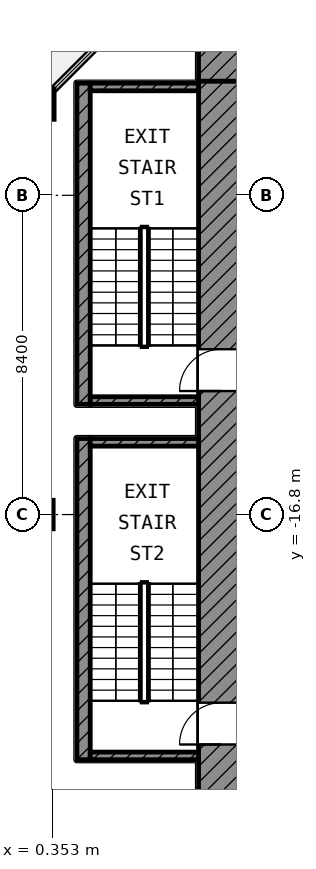
"""IFC4 building model, lengths in metres.
Left out: names, types, materials, properties, quantities, classifications, styles, units other than length and angle.
Written with IfcOpenShell. Run it as: python <this file> out.ifc"""

import sys

from ifc_helpers import new_model, si_unit, direction, frame, frame_2d, origin, origin_2d, place, context, subcontext, project, spatial, rectangle, extrude, element, fill, save


model = new_model("IFC4")
c1 = context("Model", 3, precision=1e-05, world=origin(), true_north=direction((0.0, 1.0)))
c2 = subcontext(c1, "Body", "Model", "MODEL_VIEW")
j1 = project(units=[si_unit("LENGTHUNIT", "METRE"), si_unit("PLANEANGLEUNIT", "RADIAN")], contexts=[c1])
p1 = place(None, origin())
s1 = spatial("IfcSite", under=j1, at=p1, CompositionType="ELEMENT")
p2 = place(p1, origin())
s2 = spatial("IfcBuilding", under=s1, at=p2, CompositionType="ELEMENT")
p3 = place(p2, frame((0.0, 0.0, 315.4)))
s3 = spatial("IfcBuildingStorey", under=s2, at=p3, CompositionType="ELEMENT", Elevation=315.4)
p4 = place(p3, frame((0.0, -6.0, 0.0), z_axis=(0.0, 0.0, 1.0), x_axis=(1.0, 0.0, 0.0)))
e1 = element("IfcColumn", 1, at=p4, inside=s3, PredefinedType="COLUMN", context=c2, shape_type="SweptSolid", body=[
    extrude(rectangle(XDim=0.8, YDim=0.8, at=origin_2d()), origin(), (0.0, 0.0, 1.0), 4.2),
])
p5 = place(p3, frame((0.0, -16.8, 0.0), z_axis=(0.0, 0.0, 1.0), x_axis=(1.0, 0.0, 0.0)))
e2 = element("IfcColumn", 2, at=p5, inside=s3, PredefinedType="COLUMN", context=c2, shape_type="SweptSolid", body=[
    extrude(rectangle(XDim=0.75, YDim=0.75, at=origin_2d()), origin(), (0.0, 0.0, 1.0), 4.2),
])
p6 = place(p3, frame((4.2, -4.8, 0.0), z_axis=(0.0, 0.0, 1.0), x_axis=(1.0, 0.0, 0.0)))
e3 = element("IfcWall", 3, at=p6, inside=s3, PredefinedType="SHEAR", context=c2, shape_type="SweptSolid", body=[
    extrude(rectangle(XDim=20.5, YDim=1.2, at=frame_2d((10.25, 0.0))), origin(), (0.0, 0.0, 1.0), 3.6),
])
p7 = place(p6, frame((1.95, 0.0, 0.0)))
e4 = element("IfcOpeningElement", 4, at=p7, cuts=e3, PredefinedType="OPENING", context=c2, shape_type="SweptSolid", body=[
    extrude(rectangle(XDim=1.1, YDim=2.1, at=frame_2d((0.55, 1.05))), frame((0.0, 0.61, 0.0), z_axis=(0.0, -1.0, 0.0), x_axis=(1.0, 0.0, 0.0)), (0.0, 0.0, 1.0), 1.22),
])
p8 = place(p6, frame((17.95, 0.0, 0.0)))
e5 = element("IfcOpeningElement", 5, at=p8, cuts=e3, PredefinedType="OPENING", context=c2, shape_type="SweptSolid", body=[
    extrude(rectangle(XDim=1.1, YDim=2.1, at=frame_2d((0.55, 1.05))), frame((0.0, 0.61, 0.0), z_axis=(0.0, -1.0, 0.0), x_axis=(1.0, 0.0, 0.0)), (0.0, 0.0, 1.0), 1.22),
])
p9 = place(p3, frame((4.8, -24.7, 0.0), z_axis=(0.0, 0.0, 1.0), x_axis=(0.0, 1.0, 0.0)))
e6 = element("IfcWall", 6, at=p9, inside=s3, PredefinedType="SHEAR", context=c2, shape_type="SweptSolid", body=[
    extrude(rectangle(XDim=19.3, YDim=1.2, at=frame_2d((9.65, 0.0))), origin(), (0.0, 0.0, 1.0), 3.6),
])
p10 = place(p9, frame((11.15, 0.0, 0.0)))
e7 = element("IfcOpeningElement", 7, at=p10, cuts=e6, PredefinedType="OPENING", context=c2, shape_type="SweptSolid", body=[
    extrude(rectangle(XDim=1.1, YDim=2.1, at=frame_2d((0.55, 1.05))), frame((0.0, 0.61, 0.0), z_axis=(0.0, -1.0, 0.0), x_axis=(1.0, 0.0, 0.0)), (0.0, 0.0, 1.0), 1.22),
])
p11 = place(p9, frame((1.85, 0.0, 0.0)))
e8 = element("IfcOpeningElement", 8, at=p11, cuts=e6, PredefinedType="OPENING", context=c2, shape_type="SweptSolid", body=[
    extrude(rectangle(XDim=1.1, YDim=2.1, at=frame_2d((0.55, 1.05))), frame((0.0, 0.61, 0.0), z_axis=(0.0, -1.0, 0.0), x_axis=(1.0, 0.0, 0.0)), (0.0, 0.0, 1.0), 1.22),
])
p12 = place(p3, frame((1.175, -13.9, 0.0), z_axis=(0.0, 0.0, 1.0), x_axis=(0.0, 1.0, 0.0)))
e9 = element("IfcWall", 9, at=p12, inside=s3, PredefinedType="SHEAR", context=c2, shape_type="SweptSolid", body=[
    extrude(rectangle(XDim=8.45, YDim=0.35, at=frame_2d((4.225, 0.0))), origin(), (0.0, 0.0, 1.0), 3.6),
])
for number, where, z_axis, x_axis in (
    (10, (1.35, -5.55, 0.0), (0.0, 0.0, 1.0), (1.0, 0.0, 0.0)),
    (11, (1.35, -13.8, 0.0), (0.0, 0.0, 1.0), (1.0, 0.0, 0.0)),
):
    element("IfcWall", number, at=place(p3, frame(where, z_axis=z_axis, x_axis=x_axis)), inside=s3, PredefinedType="SHEAR", context=c2, shape_type="SweptSolid", body=[
        extrude(rectangle(XDim=2.85, YDim=0.2, at=frame_2d((1.425, 0.0))), origin(), (0.0, 0.0, 1.0), 3.6),
    ])
p13 = place(p3, frame((1.175, -23.25, 0.0), z_axis=(0.0, 0.0, 1.0), x_axis=(0.0, 1.0, 0.0)))
e12 = element("IfcWall", 12, at=p13, inside=s3, PredefinedType="SHEAR", context=c2, shape_type="SweptSolid", body=[
    extrude(rectangle(XDim=8.45, YDim=0.35, at=frame_2d((4.225, 0.0))), origin(), (0.0, 0.0, 1.0), 3.6),
])
for number, where, z_axis, x_axis in (
    (13, (1.35, -14.9, 0.0), (0.0, 0.0, 1.0), (1.0, 0.0, 0.0)),
    (14, (1.35, -23.15, 0.0), (0.0, 0.0, 1.0), (1.0, 0.0, 0.0)),
):
    element("IfcWall", number, at=place(p3, frame(where, z_axis=z_axis, x_axis=x_axis)), inside=s3, PredefinedType="SHEAR", context=c2, shape_type="SweptSolid", body=[
        extrude(rectangle(XDim=2.85, YDim=0.2, at=frame_2d((1.425, 0.0))), origin(), (0.0, 0.0, 1.0), 3.6),
    ])
p14 = place(p10, origin())
e15 = element("IfcDoor", 15, at=p14, inside=s3, OperationType="SINGLE_SWING_LEFT", PredefinedType="DOOR", context=c2, shape_type="SweptSolid", body=[
    extrude(rectangle(XDim=1.1, YDim=2.1, at=frame_2d((0.55, 1.05))), frame((0.0, 0.025, 0.0), z_axis=(0.0, -1.0, 0.0), x_axis=(1.0, 0.0, 0.0)), (0.0, 0.0, 1.0), 0.05),
])
fill(e7, e15)
p15 = place(p11, origin())
e16 = element("IfcDoor", 16, at=p15, inside=s3, OperationType="SINGLE_SWING_LEFT", PredefinedType="DOOR", context=c2, shape_type="SweptSolid", body=[
    extrude(rectangle(XDim=1.1, YDim=2.1, at=frame_2d((0.55, 1.05))), frame((0.0, 0.025, 0.0), z_axis=(0.0, -1.0, 0.0), x_axis=(1.0, 0.0, 0.0)), (0.0, 0.0, 1.0), 0.05),
])
fill(e8, e16)
save(model, sys.argv[1])
